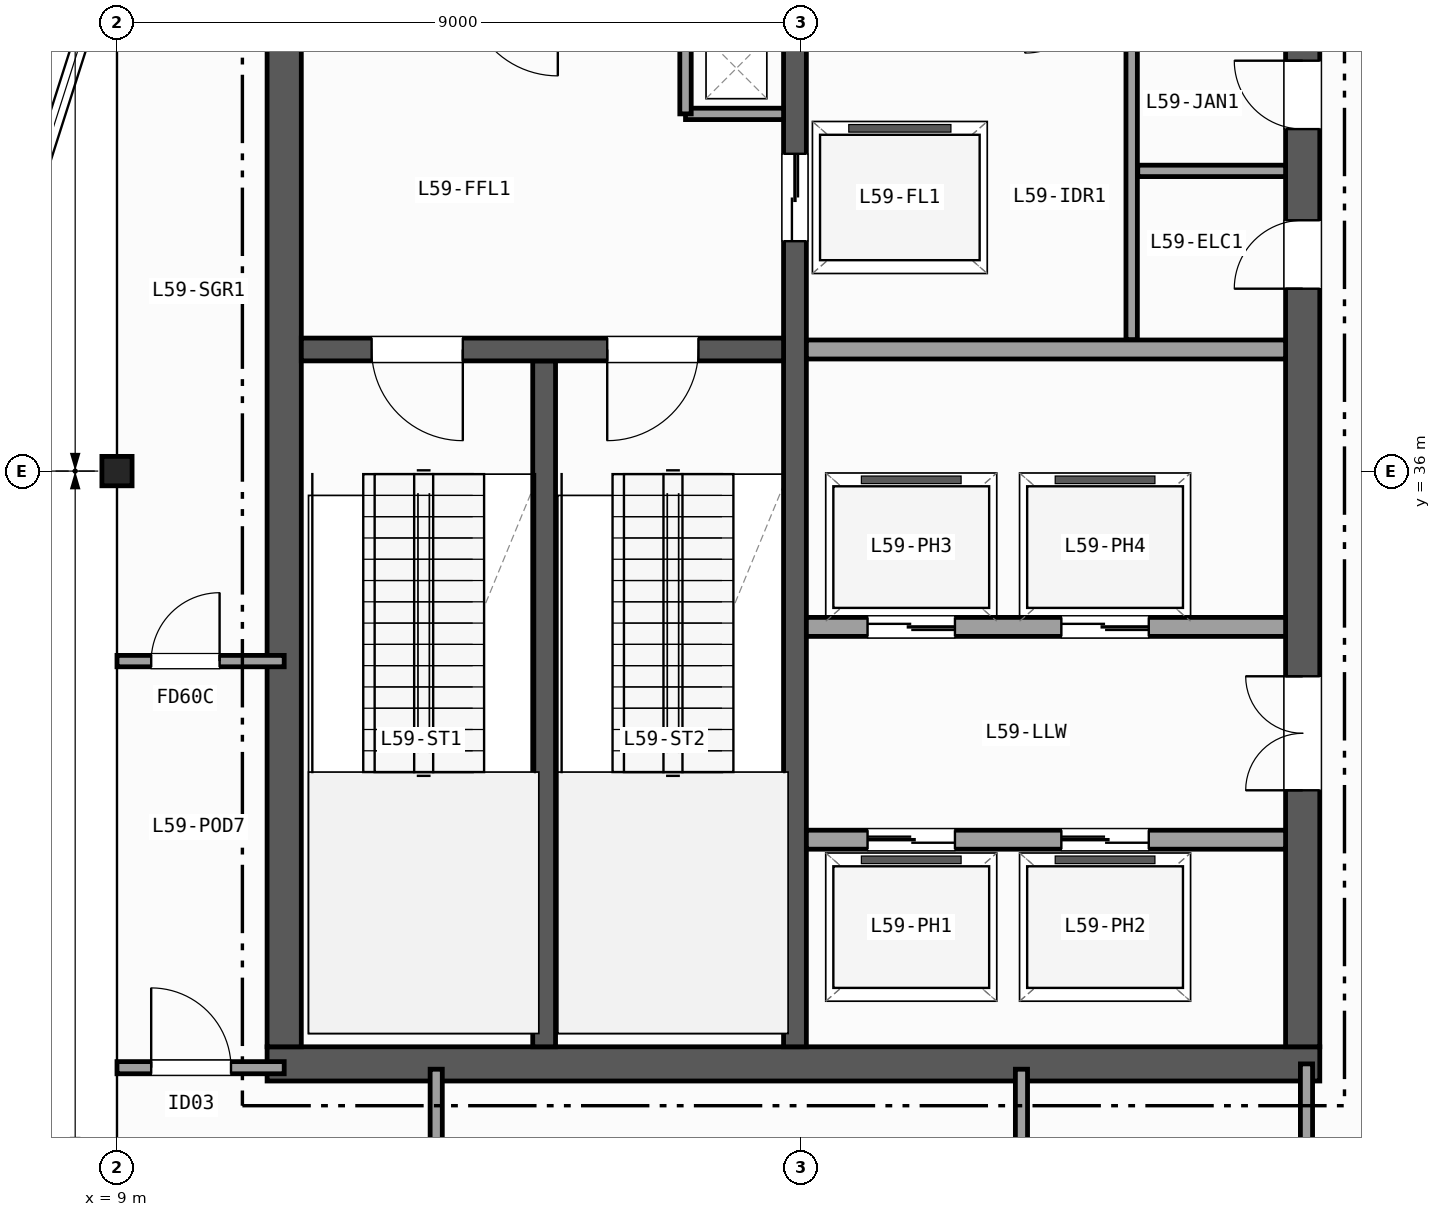
"""IFC4 building model, lengths in metres.
Left out: names, types, materials, properties, quantities, classifications, styles, units other than length and angle.
Written with IfcOpenShell. Run it as: python <this file> out.ifc"""

import sys

from ifc_helpers import new_model, si_unit, direction, frame, frame_2d, origin, origin_2d, place, context, subcontext, project, spatial, rectangle, i_section, extrude, element, fill, save


model = new_model("IFC4")
c1 = context("Model", 3, precision=1e-05, world=origin(), true_north=direction((0.0, 1.0)))
c2 = subcontext(c1, "Body", "Model", "MODEL_VIEW")
j1 = project(units=[si_unit("LENGTHUNIT", "METRE"), si_unit("PLANEANGLEUNIT", "RADIAN")], contexts=[c1])
p1 = place(None, origin())
s1 = spatial("IfcSite", under=j1, at=p1, CompositionType="ELEMENT")
p2 = place(p1, origin())
s2 = spatial("IfcBuilding", under=s1, at=p2, CompositionType="ELEMENT")
p3 = place(p2, frame((0.0, 0.0, 235.8)))
s3 = spatial("IfcBuildingStorey", under=s2, at=p3, CompositionType="ELEMENT", Elevation=235.8)
p4 = place(p3, frame((9.0, 36.0, 0.0), z_axis=(0.0, 0.0, 1.0), x_axis=(1.0, 0.0, 0.0)))
e1 = element("IfcColumn", 1, at=p4, inside=s3, PredefinedType="COLUMN", context=c2, shape_type="SweptSolid", body=[
    extrude(i_section(OverallWidth=0.397, OverallDepth=0.387, WebThickness=0.021, FlangeThickness=0.033, FilletRadius=0.015, at=origin_2d()), origin(), (0.0, 0.0, 1.0), 5.0),
])
p5 = place(p3, frame((10.975, 28.2, 0.0), z_axis=(0.0, 0.0, 1.0), x_axis=(1.0, 0.0, 0.0)))
e2 = element("IfcWall", 2, at=p5, inside=s3, PredefinedType="SHEAR", context=c2, shape_type="SweptSolid", body=[
    extrude(rectangle(XDim=13.85, YDim=0.45, at=frame_2d((6.925, 0.0))), origin(), (0.0, 0.0, 1.0), 4.72),
])
p6 = place(p3, frame((11.2, 42.175, 0.0), z_axis=(0.0, 0.0, 1.0), x_axis=(0.0, -1.0, 0.0)))
e3 = element("IfcWall", 3, at=p6, inside=s3, PredefinedType="SHEAR", context=c2, shape_type="SweptSolid", body=[
    extrude(rectangle(XDim=13.75, YDim=0.45, at=frame_2d((6.875, 0.0))), origin(), (0.0, 0.0, 1.0), 4.72),
])
p7 = place(p3, frame((24.6, 28.425, 0.0), z_axis=(0.0, 0.0, 1.0), x_axis=(0.0, 1.0, 0.0)))
e4 = element("IfcWall", 4, at=p7, inside=s3, PredefinedType="SHEAR", context=c2, shape_type="SweptSolid", body=[
    extrude(rectangle(XDim=13.75, YDim=0.45, at=frame_2d((6.875, 0.0))), origin(), (0.0, 0.0, 1.0), 4.72),
])
p8 = place(p7, frame((3.375, 0.0, 0.0)))
e5 = element("IfcOpeningElement", 5, at=p8, cuts=e4, PredefinedType="OPENING", context=c2, shape_type="SweptSolid", body=[
    extrude(rectangle(XDim=1.5, YDim=2.2, at=frame_2d((0.75, 1.1))), frame((0.0, 0.235, 0.0), z_axis=(0.0, -1.0, 0.0), x_axis=(1.0, 0.0, 0.0)), (0.0, 0.0, 1.0), 0.47),
])
p9 = place(p7, frame((9.975, 0.0, 0.0)))
e6 = element("IfcOpeningElement", 6, at=p9, cuts=e4, PredefinedType="OPENING", context=c2, shape_type="SweptSolid", body=[
    extrude(rectangle(XDim=0.9, YDim=2.1, at=frame_2d((0.45, 1.05))), frame((0.0, 0.235, 0.0), z_axis=(0.0, -1.0, 0.0), x_axis=(1.0, 0.0, 0.0)), (0.0, 0.0, 1.0), 0.47),
])
p10 = place(p7, frame((12.075, 0.0, 0.0)))
e7 = element("IfcOpeningElement", 7, at=p10, cuts=e4, PredefinedType="OPENING", context=c2, shape_type="SweptSolid", body=[
    extrude(rectangle(XDim=0.9, YDim=2.1, at=frame_2d((0.45, 1.05))), frame((0.0, 0.235, 0.0), z_axis=(0.0, -1.0, 0.0), x_axis=(1.0, 0.0, 0.0)), (0.0, 0.0, 1.0), 0.47),
])
p11 = place(p3, frame((14.62, 28.425, 0.0), z_axis=(0.0, 0.0, 1.0), x_axis=(0.0, 1.0, 0.0)))
e8 = element("IfcWall", 8, at=p11, inside=s3, PredefinedType="SHEAR", context=c2, shape_type="SweptSolid", body=[
    extrude(rectangle(XDim=9.025, YDim=0.3, at=frame_2d((4.512, 0.0))), origin(), (0.0, 0.0, 1.0), 4.72),
])
p12 = place(p3, frame((17.92, 42.175, 0.0), z_axis=(0.0, 0.0, 1.0), x_axis=(0.0, -1.0, 0.0)))
e9 = element("IfcWall", 9, at=p12, inside=s3, PredefinedType="SHEAR", context=c2, shape_type="SweptSolid", body=[
    extrude(rectangle(XDim=13.75, YDim=0.3, at=frame_2d((6.875, 0.0))), origin(), (0.0, 0.0, 1.0), 4.72),
])
p13 = place(p12, frame((2.0, 0.0, 0.0)))
e10 = element("IfcOpeningElement", 10, at=p13, cuts=e9, PredefinedType="OPENING", context=c2, shape_type="SweptSolid", body=[
    extrude(rectangle(XDim=1.15, YDim=2.15, at=frame_2d((0.575, 1.075))), frame((0.0, 0.16, 0.0), z_axis=(0.0, -1.0, 0.0), x_axis=(1.0, 0.0, 0.0)), (0.0, 0.0, 1.0), 0.32),
])
p14 = place(p3, frame((17.77, 37.6, 0.0), z_axis=(0.0, 0.0, 1.0), x_axis=(-1.0, 0.0, 0.0)))
e11 = element("IfcWall", 11, at=p14, inside=s3, PredefinedType="SHEAR", context=c2, shape_type="SweptSolid", body=[
    extrude(rectangle(XDim=6.345, YDim=0.3, at=frame_2d((3.172, 0.0))), origin(), (0.0, 0.0, 1.0), 4.72),
])
p15 = place(p14, frame((4.22, 0.0, 0.0)))
e12 = element("IfcOpeningElement", 12, at=p15, cuts=e11, PredefinedType="OPENING", context=c2, shape_type="SweptSolid", body=[
    extrude(rectangle(XDim=1.2, YDim=2.15, at=frame_2d((0.6, 1.075))), frame((0.0, 0.16, 0.0), z_axis=(0.0, -1.0, 0.0), x_axis=(1.0, 0.0, 0.0)), (0.0, 0.0, 1.0), 0.32),
])
p16 = place(p14, frame((1.12, 0.0, 0.0)))
e13 = element("IfcOpeningElement", 13, at=p16, cuts=e11, PredefinedType="OPENING", context=c2, shape_type="SweptSolid", body=[
    extrude(rectangle(XDim=1.2, YDim=2.15, at=frame_2d((0.6, 1.075))), frame((0.0, 0.16, 0.0), z_axis=(0.0, -1.0, 0.0), x_axis=(1.0, 0.0, 0.0)), (0.0, 0.0, 1.0), 0.32),
])
p17 = place(p3, frame((16.48, 40.7, 0.0), z_axis=(0.0, 0.0, 1.0), x_axis=(1.0, 0.0, 0.0)))
e14 = element("IfcWall", 14, at=p17, inside=s3, PredefinedType="PARTITIONING", context=c2, shape_type="SweptSolid", body=[
    extrude(rectangle(XDim=1.29, YDim=0.15, at=frame_2d((0.645, 0.0))), origin(), (0.0, 0.0, 1.0), 4.72),
])
p18 = place(p3, frame((16.48, 40.7, 0.0), z_axis=(0.0, 0.0, 1.0), x_axis=(0.0, 1.0, 0.0)))
e15 = element("IfcWall", 15, at=p18, inside=s3, PredefinedType="PARTITIONING", context=c2, shape_type="SweptSolid", body=[
    extrude(rectangle(XDim=1.475, YDim=0.15, at=frame_2d((0.738, 0.0))), origin(), (0.0, 0.0, 1.0), 4.72),
])
p19 = place(p3, frame((18.07, 37.6, 0.0), z_axis=(0.0, 0.0, 1.0), x_axis=(1.0, 0.0, 0.0)))
e16 = element("IfcWall", 16, at=p19, inside=s3, PredefinedType="PARTITIONING", context=c2, shape_type="SweptSolid", body=[
    extrude(rectangle(XDim=6.305, YDim=0.25, at=frame_2d((3.152, 0.0))), origin(), (0.0, 0.0, 1.0), 4.72),
])
p20 = place(p3, frame((18.07, 31.15, 0.0), z_axis=(0.0, 0.0, 1.0), x_axis=(1.0, 0.0, 0.0)))
e17 = element("IfcWall", 17, at=p20, inside=s3, PredefinedType="PARTITIONING", context=c2, shape_type="SweptSolid", body=[
    extrude(rectangle(XDim=6.305, YDim=0.25, at=frame_2d((3.152, 0.0))), origin(), (0.0, 0.0, 1.0), 4.72),
])
p21 = place(p20, frame((0.805, 0.0, 0.0)))
e18 = element("IfcOpeningElement", 18, at=p21, cuts=e17, PredefinedType="OPENING", context=c2, shape_type="SweptSolid", body=[
    extrude(rectangle(XDim=1.15, YDim=2.15, at=frame_2d((0.575, 1.075))), frame((0.0, 0.135, 0.0), z_axis=(0.0, -1.0, 0.0), x_axis=(1.0, 0.0, 0.0)), (0.0, 0.0, 1.0), 0.27),
])
p22 = place(p20, frame((3.355, 0.0, 0.0)))
e19 = element("IfcOpeningElement", 19, at=p22, cuts=e17, PredefinedType="OPENING", context=c2, shape_type="SweptSolid", body=[
    extrude(rectangle(XDim=1.15, YDim=2.15, at=frame_2d((0.575, 1.075))), frame((0.0, 0.135, 0.0), z_axis=(0.0, -1.0, 0.0), x_axis=(1.0, 0.0, 0.0)), (0.0, 0.0, 1.0), 0.27),
])
p23 = place(p3, frame((24.375, 33.95, 0.0), z_axis=(0.0, 0.0, 1.0), x_axis=(-1.0, 0.0, 0.0)))
e20 = element("IfcWall", 20, at=p23, inside=s3, PredefinedType="PARTITIONING", context=c2, shape_type="SweptSolid", body=[
    extrude(rectangle(XDim=6.305, YDim=0.25, at=frame_2d((3.152, 0.0))), origin(), (0.0, 0.0, 1.0), 4.72),
])
p24 = place(p23, frame((4.35, 0.0, 0.0)))
e21 = element("IfcOpeningElement", 21, at=p24, cuts=e20, PredefinedType="OPENING", context=c2, shape_type="SweptSolid", body=[
    extrude(rectangle(XDim=1.15, YDim=2.15, at=frame_2d((0.575, 1.075))), frame((0.0, 0.135, 0.0), z_axis=(0.0, -1.0, 0.0), x_axis=(1.0, 0.0, 0.0)), (0.0, 0.0, 1.0), 0.27),
])
p25 = place(p23, frame((1.8, 0.0, 0.0)))
e22 = element("IfcOpeningElement", 22, at=p25, cuts=e20, PredefinedType="OPENING", context=c2, shape_type="SweptSolid", body=[
    extrude(rectangle(XDim=1.15, YDim=2.15, at=frame_2d((0.575, 1.075))), frame((0.0, 0.135, 0.0), z_axis=(0.0, -1.0, 0.0), x_axis=(1.0, 0.0, 0.0)), (0.0, 0.0, 1.0), 0.27),
])
p26 = place(p3, frame((22.35, 37.73, 0.0), z_axis=(0.0, 0.0, 1.0), x_axis=(0.0, 1.0, 0.0)))
e23 = element("IfcWall", 23, at=p26, inside=s3, PredefinedType="PARTITIONING", context=c2, shape_type="SweptSolid", body=[
    extrude(rectangle(XDim=4.445, YDim=0.15, at=frame_2d((2.223, 0.0))), origin(), (0.0, 0.0, 1.0), 4.72),
])
p27 = place(p3, frame((22.43, 39.95, 0.0), z_axis=(0.0, 0.0, 1.0), x_axis=(1.0, 0.0, 0.0)))
e24 = element("IfcWall", 24, at=p27, inside=s3, PredefinedType="PARTITIONING", context=c2, shape_type="SweptSolid", body=[
    extrude(rectangle(XDim=1.945, YDim=0.15, at=frame_2d((0.973, 0.0))), origin(), (0.0, 0.0, 1.0), 4.72),
])
p28 = place(p3, frame((9.0, 28.15, 0.0), z_axis=(0.0, 0.0, 1.0), x_axis=(1.0, 0.0, 0.0)))
e25 = element("IfcWall", 25, at=p28, inside=s3, PredefinedType="PARTITIONING", context=c2, shape_type="SweptSolid", body=[
    extrude(rectangle(XDim=2.2, YDim=0.16, at=frame_2d((1.1, 0.0))), origin(), (0.0, 0.0, 1.0), 4.007),
])
p29 = place(p28, frame((0.45, 0.0, 0.0)))
e26 = element("IfcOpeningElement", 26, at=p29, cuts=e25, PredefinedType="OPENING", context=c2, shape_type="SweptSolid", body=[
    extrude(rectangle(XDim=1.05, YDim=2.15, at=frame_2d((0.525, 1.075))), frame((0.0, 0.09, 0.0), z_axis=(0.0, -1.0, 0.0), x_axis=(1.0, 0.0, 0.0)), (0.0, 0.0, 1.0), 0.18),
])
p30 = place(p3, frame((9.0, 33.5, 0.0), z_axis=(0.0, 0.0, 1.0), x_axis=(1.0, 0.0, 0.0)))
e27 = element("IfcWall", 27, at=p30, inside=s3, PredefinedType="PARTITIONING", context=c2, shape_type="SweptSolid", body=[
    extrude(rectangle(XDim=2.2, YDim=0.15, at=frame_2d((1.1, 0.0))), origin(), (0.0, 0.0, 1.0), 4.007),
])
p31 = place(p30, frame((0.45, 0.0, 0.0)))
e28 = element("IfcOpeningElement", 28, at=p31, cuts=e27, PredefinedType="OPENING", context=c2, shape_type="SweptSolid", body=[
    extrude(rectangle(XDim=0.9, YDim=2.1, at=frame_2d((0.45, 1.05))), frame((0.0, 0.085, 0.0), z_axis=(0.0, -1.0, 0.0), x_axis=(1.0, 0.0, 0.0)), (0.0, 0.0, 1.0), 0.17),
])
p32 = place(p3, frame((24.65, 9.0, 0.0), z_axis=(0.0, 0.0, 1.0), x_axis=(0.0, 1.0, 0.0)))
e29 = element("IfcWall", 29, at=p32, inside=s3, PredefinedType="PARTITIONING", context=c2, shape_type="SweptSolid", body=[
    extrude(rectangle(XDim=19.2, YDim=0.16, at=frame_2d((9.6, 0.0))), origin(), (0.0, 0.0, 1.0), 4.007),
])
p33 = place(p32, frame((12.2, 0.0, 0.0)))
e30 = element("IfcOpeningElement", 30, at=p33, cuts=e29, PredefinedType="OPENING", context=c2, shape_type="SweptSolid", body=[
    extrude(rectangle(XDim=0.86, YDim=2.05, at=frame_2d((0.43, 1.025))), frame((0.0, 0.09, 0.0), z_axis=(0.0, -1.0, 0.0), x_axis=(1.0, 0.0, 0.0)), (0.0, 0.0, 1.0), 0.18),
])
p34 = place(p32, frame((4.2, 0.0, 0.0)))
e31 = element("IfcOpeningElement", 31, at=p34, cuts=e29, PredefinedType="OPENING", context=c2, shape_type="SweptSolid", body=[
    extrude(rectangle(XDim=0.95, YDim=2.1, at=frame_2d((0.475, 1.05))), frame((0.0, 0.09, 0.0), z_axis=(0.0, -1.0, 0.0), x_axis=(1.0, 0.0, 0.0)), (0.0, 0.0, 1.0), 0.18),
])
p35 = place(p3, frame((13.2, 18.0, 0.0), z_axis=(0.0, 0.0, 1.0), x_axis=(0.0, 1.0, 0.0)))
e32 = element("IfcWall", 32, at=p35, inside=s3, PredefinedType="PARTITIONING", context=c2, shape_type="SweptSolid", body=[
    extrude(rectangle(XDim=10.13, YDim=0.16, at=frame_2d((5.065, 0.0))), origin(), (0.0, 0.0, 1.0), 4.089),
])
p36 = place(p35, frame((2.5, 0.0, 0.0)))
e33 = element("IfcOpeningElement", 33, at=p36, cuts=e32, PredefinedType="OPENING", context=c2, shape_type="SweptSolid", body=[
    extrude(rectangle(XDim=1.0, YDim=2.1, at=frame_2d((0.5, 1.05))), frame((0.0, 0.09, 0.0), z_axis=(0.0, -1.0, 0.0), x_axis=(1.0, 0.0, 0.0)), (0.0, 0.0, 1.0), 0.18),
])
p37 = place(p3, frame((20.9, 18.0, 0.0), z_axis=(0.0, 0.0, 1.0), x_axis=(0.0, 1.0, 0.0)))
e34 = element("IfcWall", 34, at=p37, inside=s3, PredefinedType="PARTITIONING", context=c2, shape_type="SweptSolid", body=[
    extrude(rectangle(XDim=10.13, YDim=0.16, at=frame_2d((5.065, 0.0))), origin(), (0.0, 0.0, 1.0), 4.089),
])
p38 = place(p37, frame((2.5, 0.0, 0.0)))
e35 = element("IfcOpeningElement", 35, at=p38, cuts=e34, PredefinedType="OPENING", context=c2, shape_type="SweptSolid", body=[
    extrude(rectangle(XDim=1.05, YDim=2.15, at=frame_2d((0.525, 1.075))), frame((0.0, 0.09, 0.0), z_axis=(0.0, -1.0, 0.0), x_axis=(1.0, 0.0, 0.0)), (0.0, 0.0, 1.0), 0.18),
])
p39 = place(p15, origin())
e36 = element("IfcDoor", 36, at=p39, inside=s3, OperationType="SINGLE_SWING_LEFT", PredefinedType="DOOR", context=c2, shape_type="SweptSolid", body=[
    extrude(rectangle(XDim=1.2, YDim=2.15, at=frame_2d((0.6, 1.075))), frame((0.0, 0.025, 0.0), z_axis=(0.0, -1.0, 0.0), x_axis=(1.0, 0.0, 0.0)), (0.0, 0.0, 1.0), 0.05),
])
fill(e12, e36)
p40 = place(p16, origin())
e37 = element("IfcDoor", 37, at=p40, inside=s3, OperationType="SINGLE_SWING_RIGHT", PredefinedType="DOOR", context=c2, shape_type="SweptSolid", body=[
    extrude(rectangle(XDim=1.2, YDim=2.15, at=frame_2d((0.6, 1.075))), frame((0.0, 0.025, 0.0), z_axis=(0.0, -1.0, 0.0), x_axis=(1.0, 0.0, 0.0)), (0.0, 0.0, 1.0), 0.05),
])
fill(e13, e37)
p41 = place(p8, origin())
e38 = element("IfcDoor", 38, at=p41, inside=s3, OperationType="DOUBLE_DOOR_SINGLE_SWING", PredefinedType="DOOR", context=c2, shape_type="SweptSolid", body=[
    extrude(rectangle(XDim=1.5, YDim=2.2, at=frame_2d((0.75, 1.1))), frame((0.0, 0.025, 0.0), z_axis=(0.0, -1.0, 0.0), x_axis=(1.0, 0.0, 0.0)), (0.0, 0.0, 1.0), 0.05),
])
fill(e5, e38)
p42 = place(p9, origin())
e39 = element("IfcDoor", 39, at=p42, inside=s3, OperationType="SINGLE_SWING_LEFT", PredefinedType="DOOR", context=c2, shape_type="SweptSolid", body=[
    extrude(rectangle(XDim=0.9, YDim=2.1, at=frame_2d((0.45, 1.05))), frame((0.0, 0.025, 0.0), z_axis=(0.0, -1.0, 0.0), x_axis=(1.0, 0.0, 0.0)), (0.0, 0.0, 1.0), 0.05),
])
fill(e6, e39)
p43 = place(p10, origin())
e40 = element("IfcDoor", 40, at=p43, inside=s3, OperationType="SINGLE_SWING_RIGHT", PredefinedType="DOOR", context=c2, shape_type="SweptSolid", body=[
    extrude(rectangle(XDim=0.9, YDim=2.1, at=frame_2d((0.45, 1.05))), frame((0.0, 0.025, 0.0), z_axis=(0.0, -1.0, 0.0), x_axis=(1.0, 0.0, 0.0)), (0.0, 0.0, 1.0), 0.05),
])
fill(e7, e40)
p44 = place(p13, origin())
e41 = element("IfcDoor", 41, at=p44, inside=s3, OperationType="DOUBLE_DOOR_SLIDING", PredefinedType="DOOR", context=c2, shape_type="SweptSolid", body=[
    extrude(rectangle(XDim=1.15, YDim=2.15, at=frame_2d((0.575, 1.075))), frame((0.0, 0.025, 0.0), z_axis=(0.0, -1.0, 0.0), x_axis=(1.0, 0.0, 0.0)), (0.0, 0.0, 1.0), 0.05),
])
fill(e10, e41)
p45 = place(p21, origin())
e42 = element("IfcDoor", 42, at=p45, inside=s3, OperationType="DOUBLE_DOOR_SLIDING", PredefinedType="DOOR", context=c2, shape_type="SweptSolid", body=[
    extrude(rectangle(XDim=1.15, YDim=2.15, at=frame_2d((0.575, 1.075))), frame((0.0, 0.025, 0.0), z_axis=(0.0, -1.0, 0.0), x_axis=(1.0, 0.0, 0.0)), (0.0, 0.0, 1.0), 0.05),
])
fill(e18, e42)
p46 = place(p22, origin())
e43 = element("IfcDoor", 43, at=p46, inside=s3, OperationType="DOUBLE_DOOR_SLIDING", PredefinedType="DOOR", context=c2, shape_type="SweptSolid", body=[
    extrude(rectangle(XDim=1.15, YDim=2.15, at=frame_2d((0.575, 1.075))), frame((0.0, 0.025, 0.0), z_axis=(0.0, -1.0, 0.0), x_axis=(1.0, 0.0, 0.0)), (0.0, 0.0, 1.0), 0.05),
])
fill(e19, e43)
p47 = place(p24, origin())
e44 = element("IfcDoor", 44, at=p47, inside=s3, OperationType="DOUBLE_DOOR_SLIDING", PredefinedType="DOOR", context=c2, shape_type="SweptSolid", body=[
    extrude(rectangle(XDim=1.15, YDim=2.15, at=frame_2d((0.575, 1.075))), frame((0.0, 0.025, 0.0), z_axis=(0.0, -1.0, 0.0), x_axis=(1.0, 0.0, 0.0)), (0.0, 0.0, 1.0), 0.05),
])
fill(e21, e44)
p48 = place(p25, origin())
e45 = element("IfcDoor", 45, at=p48, inside=s3, OperationType="DOUBLE_DOOR_SLIDING", PredefinedType="DOOR", context=c2, shape_type="SweptSolid", body=[
    extrude(rectangle(XDim=1.15, YDim=2.15, at=frame_2d((0.575, 1.075))), frame((0.0, 0.025, 0.0), z_axis=(0.0, -1.0, 0.0), x_axis=(1.0, 0.0, 0.0)), (0.0, 0.0, 1.0), 0.05),
])
fill(e22, e45)
p49 = place(p29, origin())
e46 = element("IfcDoor", 46, at=p49, inside=s3, OperationType="SINGLE_SWING_LEFT", PredefinedType="DOOR", context=c2, shape_type="SweptSolid", body=[
    extrude(rectangle(XDim=1.05, YDim=2.15, at=frame_2d((0.525, 1.075))), frame((0.0, 0.025, 0.0), z_axis=(0.0, -1.0, 0.0), x_axis=(1.0, 0.0, 0.0)), (0.0, 0.0, 1.0), 0.05),
])
fill(e26, e46)
p50 = place(p31, origin())
e47 = element("IfcDoor", 47, at=p50, inside=s3, OperationType="SINGLE_SWING_RIGHT", PredefinedType="DOOR", context=c2, shape_type="SweptSolid", body=[
    extrude(rectangle(XDim=0.9, YDim=2.1, at=frame_2d((0.45, 1.05))), frame((0.0, 0.025, 0.0), z_axis=(0.0, -1.0, 0.0), x_axis=(1.0, 0.0, 0.0)), (0.0, 0.0, 1.0), 0.05),
])
fill(e28, e47)
save(model, sys.argv[1])
